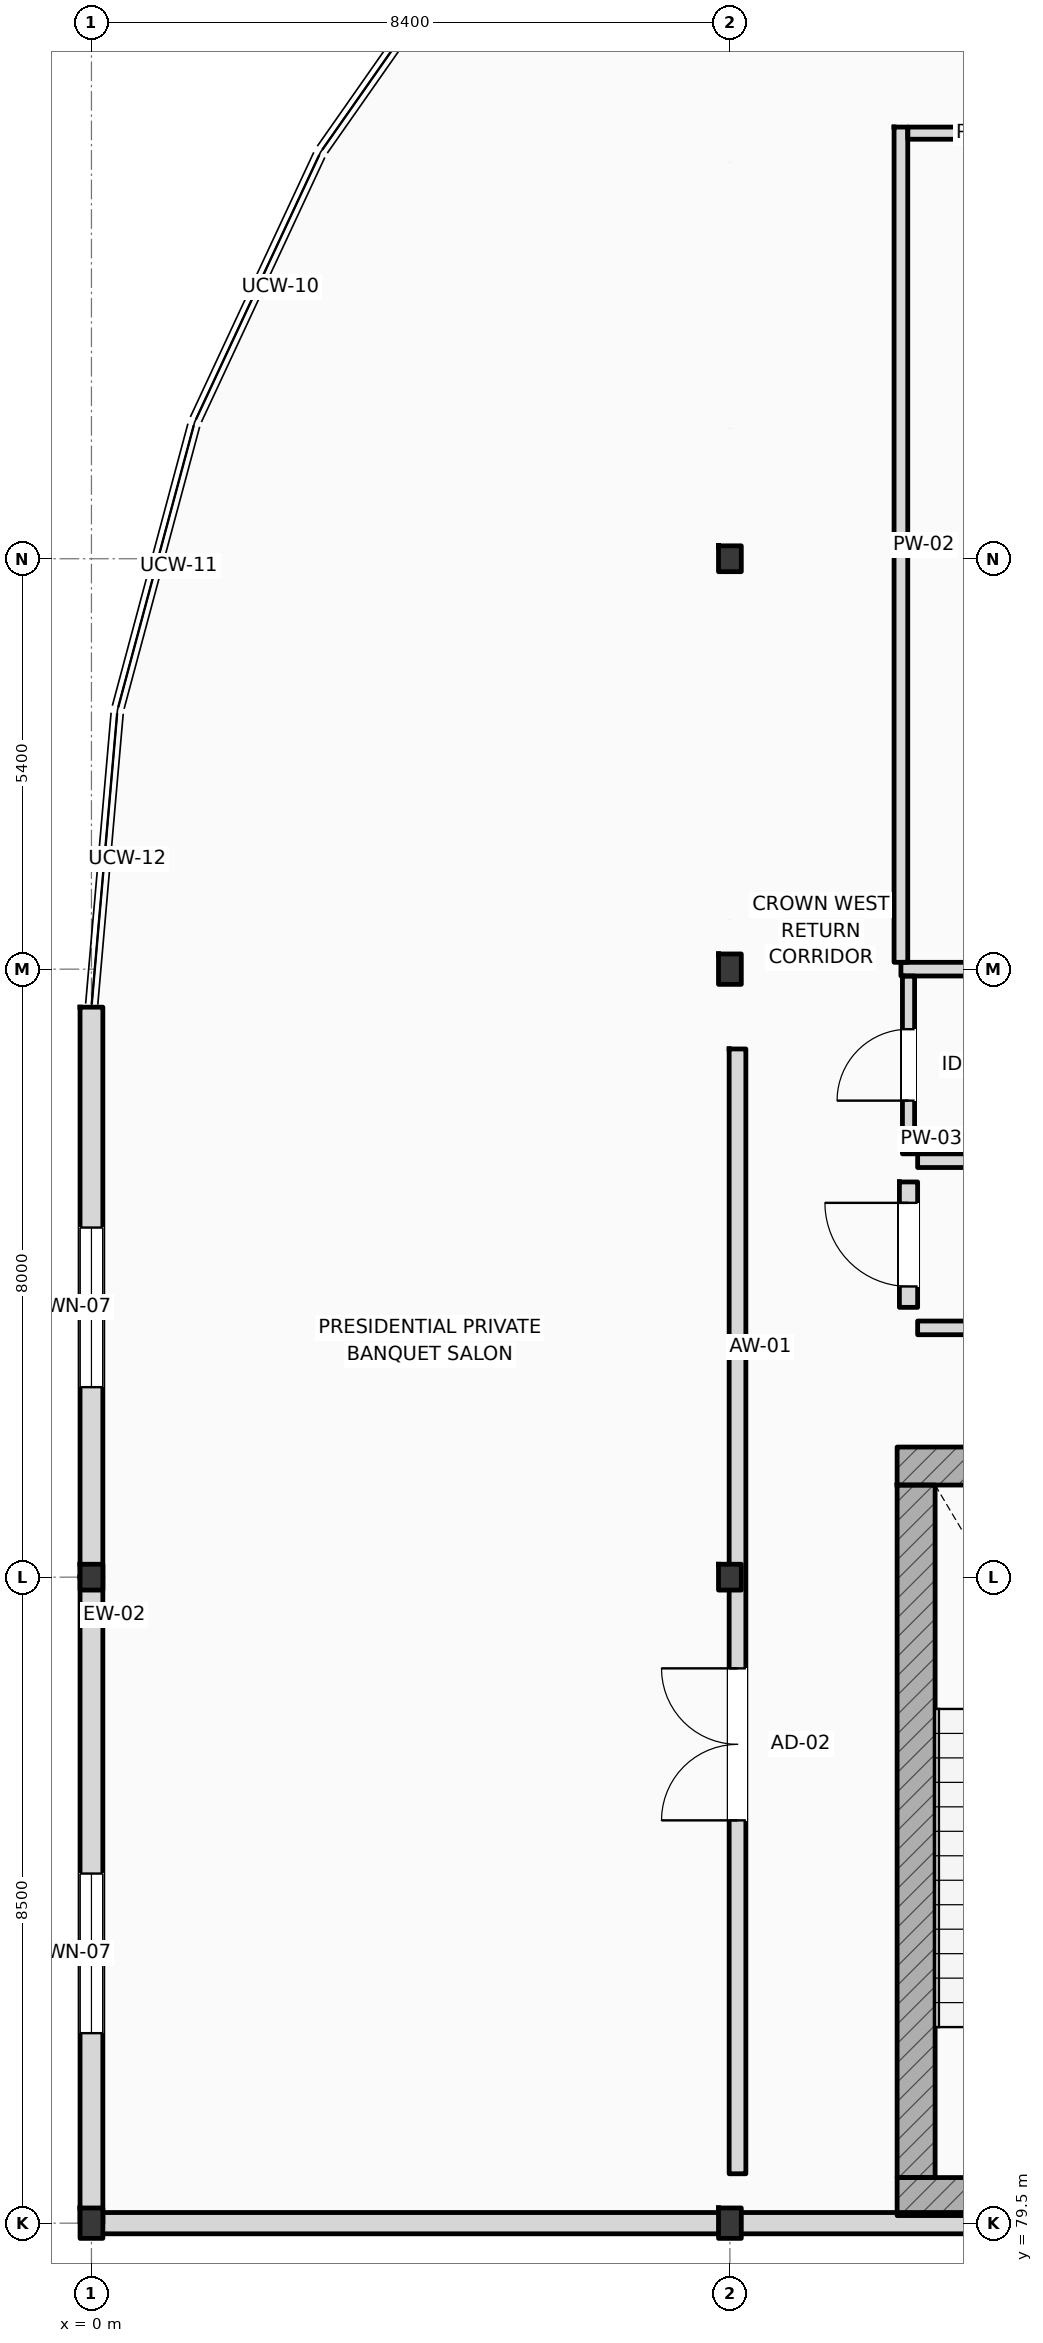
"""IFC4 building model, lengths in metres.
Left out: names, types, materials, properties, quantities, classifications, styles, units other than length and angle.
Written with IfcOpenShell. Run it as: python <this file> out.ifc"""

import sys

from ifc_helpers import new_model, si_unit, direction, frame, frame_2d, origin, origin_2d, place, context, subcontext, project, spatial, rectangle, i_section, extrude, element, fill, save


model = new_model("IFC4")
c1 = context("Model", 3, precision=1e-05, world=origin(), true_north=direction((0.0, 1.0)))
c2 = subcontext(c1, "Body", "Model", "MODEL_VIEW")
j1 = project(units=[si_unit("LENGTHUNIT", "METRE"), si_unit("PLANEANGLEUNIT", "RADIAN")], contexts=[c1])
p1 = place(None, origin())
s1 = spatial("IfcSite", under=j1, at=p1, CompositionType="ELEMENT")
p2 = place(p1, origin())
s2 = spatial("IfcBuilding", under=s1, at=p2, CompositionType="ELEMENT")
p3 = place(p2, frame((0.0, 0.0, 46.8)))
s3 = spatial("IfcBuildingStorey", under=s2, at=p3, CompositionType="ELEMENT", Elevation=46.8)
p4 = place(p3, frame((0.0, 79.5, 0.0), z_axis=(0.0, 0.0, 1.0), x_axis=(1.0, 0.0, 0.0)))
e1 = element("IfcColumn", 1, at=p4, inside=s3, PredefinedType="COLUMN", context=c2, shape_type="SweptSolid", body=[
    extrude(i_section(OverallWidth=0.3, OverallDepth=0.4, WebThickness=0.013, FlangeThickness=0.024, FilletRadius=0.027, at=origin_2d()), origin(), (0.0, 0.0, 1.0), 4.8),
])
p5 = place(p3, frame((0.0, 88.0, 0.0), z_axis=(0.0, 0.0, 1.0), x_axis=(1.0, 0.0, 0.0)))
e2 = element("IfcColumn", 2, at=p5, inside=s3, PredefinedType="COLUMN", context=c2, shape_type="SweptSolid", body=[
    extrude(i_section(OverallWidth=0.3, OverallDepth=0.34, WebThickness=0.012, FlangeThickness=0.021, FilletRadius=0.027, at=origin_2d()), origin(), (0.0, 0.0, 1.0), 4.8),
])
p6 = place(p3, frame((8.4, 79.5, 0.0), z_axis=(0.0, 0.0, 1.0), x_axis=(1.0, 0.0, 0.0)))
e3 = element("IfcColumn", 3, at=p6, inside=s3, PredefinedType="COLUMN", context=c2, shape_type="SweptSolid", body=[
    extrude(i_section(OverallWidth=0.3, OverallDepth=0.4, WebThickness=0.013, FlangeThickness=0.024, FilletRadius=0.027, at=origin_2d()), origin(), (0.0, 0.0, 1.0), 4.8),
])
p7 = place(p3, frame((8.4, 88.0, 0.0), z_axis=(0.0, 0.0, 1.0), x_axis=(1.0, 0.0, 0.0)))
e4 = element("IfcColumn", 4, at=p7, inside=s3, PredefinedType="COLUMN", context=c2, shape_type="SweptSolid", body=[
    extrude(i_section(OverallWidth=0.3, OverallDepth=0.34, WebThickness=0.012, FlangeThickness=0.021, FilletRadius=0.027, at=origin_2d()), origin(), (0.0, 0.0, 1.0), 4.8),
])
p8 = place(p3, frame((8.4, 96.0, 0.0), z_axis=(0.0, 0.0, 1.0), x_axis=(1.0, 0.0, 0.0)))
e5 = element("IfcColumn", 5, at=p8, inside=s3, PredefinedType="COLUMN", context=c2, shape_type="SweptSolid", body=[
    extrude(i_section(OverallWidth=0.3, OverallDepth=0.4, WebThickness=0.013, FlangeThickness=0.024, FilletRadius=0.027, at=origin_2d()), origin(), (0.0, 0.0, 1.0), 4.8),
])
p9 = place(p3, frame((8.4, 101.4, 0.0), z_axis=(0.0, 0.0, 1.0), x_axis=(1.0, 0.0, 0.0)))
e6 = element("IfcColumn", 6, at=p9, inside=s3, PredefinedType="COLUMN", context=c2, shape_type="SweptSolid", body=[
    extrude(i_section(OverallWidth=0.3, OverallDepth=0.34, WebThickness=0.012, FlangeThickness=0.021, FilletRadius=0.027, at=origin_2d()), origin(), (0.0, 0.0, 1.0), 4.8),
])
for number, where, z_axis, x_axis in (
    (7, (10.6, 89.462, 0.0), (0.0, 0.0, 1.0), (1.0, 0.0, 0.0)),
    (8, (10.6, 79.85, 0.0), (0.0, 0.0, 1.0), (1.0, 0.0, 0.0)),
):
    element("IfcWall", number, at=place(p3, frame(where, z_axis=z_axis, x_axis=x_axis)), inside=s3, PredefinedType="SHEAR", context=c2, shape_type="SweptSolid", body=[
        extrude(rectangle(XDim=5.16, YDim=0.5, at=frame_2d((2.58, 0.0))), origin(), (0.0, 0.0, 1.0), 4.8),
    ])
p10 = place(p3, frame((10.85, 80.1, 0.0), z_axis=(0.0, 0.0, 1.0), x_axis=(0.0, 1.0, 0.0)))
e9 = element("IfcWall", 9, at=p10, inside=s3, PredefinedType="SHEAR", context=c2, shape_type="SweptSolid", body=[
    extrude(rectangle(XDim=9.112, YDim=0.5, at=frame_2d((4.556, 0.0))), origin(), (0.0, 0.0, 1.0), 4.8),
])
p11 = place(p3, frame((0.0, 79.5, 0.0), z_axis=(0.0, 0.0, 1.0), x_axis=(0.0, 1.0, 0.0)))
e10 = element("IfcWall", 10, at=p11, inside=s3, PredefinedType="STANDARD", context=c2, shape_type="SweptSolid", body=[
    extrude(rectangle(XDim=8.5, YDim=0.3, at=frame_2d((4.25, 0.0))), origin(), (0.0, 0.0, 1.0), 4.17),
])
p12 = place(p11, frame((2.5, 0.0, 0.95)))
e11 = element("IfcOpeningElement", 11, at=p12, cuts=e10, PredefinedType="OPENING", context=c2, shape_type="SweptSolid", body=[
    extrude(rectangle(XDim=2.1, YDim=2.2, at=frame_2d((1.05, 1.1))), frame((0.0, 0.16, 0.0), z_axis=(0.0, -1.0, 0.0), x_axis=(1.0, 0.0, 0.0)), (0.0, 0.0, 1.0), 0.32),
])
p13 = place(p3, frame((0.0, 88.0, 0.0), z_axis=(0.0, 0.0, 1.0), x_axis=(0.0, 1.0, 0.0)))
e12 = element("IfcWall", 12, at=p13, inside=s3, PredefinedType="STANDARD", context=c2, shape_type="SweptSolid", body=[
    extrude(rectangle(XDim=7.5, YDim=0.3, at=frame_2d((3.75, 0.0))), origin(), (0.0, 0.0, 1.0), 4.54),
])
p14 = place(p13, frame((2.5, 0.0, 0.95)))
e13 = element("IfcOpeningElement", 13, at=p14, cuts=e12, PredefinedType="OPENING", context=c2, shape_type="SweptSolid", body=[
    extrude(rectangle(XDim=2.1, YDim=2.2, at=frame_2d((1.05, 1.1))), frame((0.0, 0.16, 0.0), z_axis=(0.0, -1.0, 0.0), x_axis=(1.0, 0.0, 0.0)), (0.0, 0.0, 1.0), 0.32),
])
p15 = place(p3, frame((0.0, 79.5, 0.0), z_axis=(0.0, 0.0, 1.0), x_axis=(1.0, 0.0, 0.0)))
e14 = element("IfcWall", 14, at=p15, inside=s3, PredefinedType="STANDARD", context=c2, shape_type="SweptSolid", body=[
    extrude(rectangle(XDim=25.2, YDim=0.28, at=frame_2d((12.6, 0.0))), origin(), (0.0, 0.0, 1.0), 3.98),
])
p16 = place(p3, frame((8.5, 80.15, 0.0), z_axis=(0.0, 0.0, 1.0), x_axis=(0.0, 1.0, 0.0)))
e15 = element("IfcWall", 15, at=p16, inside=s3, PredefinedType="PARTITIONING", context=c2, shape_type="SweptSolid", body=[
    extrude(rectangle(XDim=14.8, YDim=0.22, at=frame_2d((7.4, 0.0))), origin(), (0.0, 0.0, 1.0), 4.17),
])
p17 = place(p16, frame((4.65, 0.0, 0.0)))
e16 = element("IfcOpeningElement", 16, at=p17, cuts=e15, PredefinedType="OPENING", context=c2, shape_type="SweptSolid", body=[
    extrude(rectangle(XDim=2.0, YDim=2.35, at=frame_2d((1.0, 1.175))), frame((0.0, 0.12, 0.0), z_axis=(0.0, -1.0, 0.0), x_axis=(1.0, 0.0, 0.0)), (0.0, 0.0, 1.0), 0.24),
])
p18 = place(p3, frame((10.75, 91.55, 0.0), z_axis=(0.0, 0.0, 1.0), x_axis=(0.0, 1.0, 0.0)))
e17 = element("IfcWall", 17, at=p18, inside=s3, PredefinedType="STANDARD", context=c2, shape_type="SweptSolid", body=[
    extrude(rectangle(XDim=1.65, YDim=0.24, at=frame_2d((0.825, 0.0))), origin(), (0.0, 0.0, 1.0), 4.54),
])
p19 = place(p18, frame((0.275, 0.0, 0.0)))
e18 = element("IfcOpeningElement", 18, at=p19, cuts=e17, PredefinedType="OPENING", context=c2, shape_type="SweptSolid", body=[
    extrude(rectangle(XDim=1.1, YDim=2.2, at=frame_2d((0.55, 1.1))), frame((0.0, 0.13, 0.0), z_axis=(0.0, -1.0, 0.0), x_axis=(1.0, 0.0, 0.0)), (0.0, 0.0, 1.0), 0.26),
])
p20 = place(p3, frame((10.75, 93.57, 0.0), z_axis=(0.0, 0.0, 1.0), x_axis=(0.0, 1.0, 0.0)))
e19 = element("IfcWall", 19, at=p20, inside=s3, PredefinedType="PARTITIONING", context=c2, shape_type="SweptSolid", body=[
    extrude(rectangle(XDim=2.34, YDim=0.16, at=frame_2d((1.17, 0.0))), origin(), (0.0, 0.0, 1.0), 4.54),
])
p21 = place(p20, frame((0.7, 0.0, 0.0)))
e20 = element("IfcOpeningElement", 20, at=p21, cuts=e19, PredefinedType="OPENING", context=c2, shape_type="SweptSolid", body=[
    extrude(rectangle(XDim=0.94, YDim=2.15, at=frame_2d((0.47, 1.075))), frame((0.0, 0.09, 0.0), z_axis=(0.0, -1.0, 0.0), x_axis=(1.0, 0.0, 0.0)), (0.0, 0.0, 1.0), 0.18),
])
p22 = place(p3, frame((10.74, 107.0, 0.0), z_axis=(0.0, 0.0, 1.0), x_axis=(1.0, 0.0, 0.0)))
e21 = element("IfcWall", 21, at=p22, inside=s3, PredefinedType="PARTITIONING", context=c2, shape_type="SweptSolid", body=[
    extrude(rectangle(XDim=4.47, YDim=0.16, at=frame_2d((2.235, 0.0))), origin(), (0.0, 0.0, 1.0), 4.54),
])
p23 = place(p22, frame((1.785, 0.0, 0.0)))
e22 = element("IfcOpeningElement", 22, at=p23, cuts=e21, PredefinedType="OPENING", context=c2, shape_type="SweptSolid", body=[
    extrude(rectangle(XDim=0.9, YDim=2.1, at=frame_2d((0.45, 1.05))), frame((0.0, 0.09, 0.0), z_axis=(0.0, -1.0, 0.0), x_axis=(1.0, 0.0, 0.0)), (0.0, 0.0, 1.0), 0.18),
])
for number, where, z_axis, x_axis in (
    (23, (10.87, 91.28, 0.0), (0.0, 0.0, 1.0), (1.0, 0.0, 0.0)),
    (24, (10.87, 93.48, 0.0), (0.0, 0.0, 1.0), (1.0, 0.0, 0.0)),
):
    element("IfcWall", number, at=place(p3, frame(where, z_axis=z_axis, x_axis=x_axis)), inside=s3, PredefinedType="PARTITIONING", context=c2, shape_type="SweptSolid", body=[
        extrude(rectangle(XDim=6.17, YDim=0.18, at=frame_2d((3.085, 0.0))), origin(), (0.0, 0.0, 1.0), 4.54),
    ])
p24 = place(p3, frame((10.65, 96.0, 0.0), z_axis=(0.0, 0.0, 1.0), x_axis=(1.0, 0.0, 0.0)))
e25 = element("IfcWall", 25, at=p24, inside=s3, PredefinedType="PARTITIONING", context=c2, shape_type="SweptSolid", body=[
    extrude(rectangle(XDim=5.95, YDim=0.18, at=frame_2d((2.975, 0.0))), origin(), (0.0, 0.0, 1.0), 3.98),
])
p25 = place(p3, frame((10.65, 96.09, 0.0), z_axis=(0.0, 0.0, 1.0), x_axis=(0.0, 1.0, 0.0)))
e26 = element("IfcWall", 26, at=p25, inside=s3, PredefinedType="PARTITIONING", context=c2, shape_type="SweptSolid", body=[
    extrude(rectangle(XDim=10.99, YDim=0.18, at=frame_2d((5.495, 0.0))), origin(), (0.0, 0.0, 1.0), 4.54),
])
p26 = place(p12, origin())
e27 = element("IfcWindow", 27, at=p26, inside=s3, PartitioningType="DOUBLE_PANEL_VERTICAL", PredefinedType="WINDOW", context=c2, shape_type="SweptSolid", body=[
    extrude(rectangle(XDim=2.1, YDim=2.2, at=frame_2d((1.05, 1.1))), frame((0.0, 0.03, 0.0), z_axis=(0.0, -1.0, 0.0), x_axis=(1.0, 0.0, 0.0)), (0.0, 0.0, 1.0), 0.06),
])
fill(e11, e27)
p27 = place(p14, origin())
e28 = element("IfcWindow", 28, at=p27, inside=s3, PartitioningType="DOUBLE_PANEL_VERTICAL", PredefinedType="WINDOW", context=c2, shape_type="SweptSolid", body=[
    extrude(rectangle(XDim=2.1, YDim=2.2, at=frame_2d((1.05, 1.1))), frame((0.0, 0.03, 0.0), z_axis=(0.0, -1.0, 0.0), x_axis=(1.0, 0.0, 0.0)), (0.0, 0.0, 1.0), 0.06),
])
fill(e13, e28)
p28 = place(p17, origin())
e29 = element("IfcDoor", 29, at=p28, inside=s3, OperationType="DOUBLE_SWING_LEFT", PredefinedType="DOOR", context=c2, shape_type="SweptSolid", body=[
    extrude(rectangle(XDim=2.0, YDim=2.35, at=frame_2d((1.0, 1.175))), frame((0.0, 0.025, 0.0), z_axis=(0.0, -1.0, 0.0), x_axis=(1.0, 0.0, 0.0)), (0.0, 0.0, 1.0), 0.05),
])
fill(e16, e29)
p29 = place(p19, origin())
e30 = element("IfcDoor", 30, at=p29, inside=s3, OperationType="SINGLE_SWING_RIGHT", PredefinedType="DOOR", context=c2, shape_type="SweptSolid", body=[
    extrude(rectangle(XDim=1.1, YDim=2.2, at=frame_2d((0.55, 1.1))), frame((0.0, 0.025, 0.0), z_axis=(0.0, -1.0, 0.0), x_axis=(1.0, 0.0, 0.0)), (0.0, 0.0, 1.0), 0.05),
])
fill(e18, e30)
p30 = place(p21, origin())
e31 = element("IfcDoor", 31, at=p30, inside=s3, OperationType="SINGLE_SWING_LEFT", PredefinedType="DOOR", context=c2, shape_type="SweptSolid", body=[
    extrude(rectangle(XDim=0.94, YDim=2.15, at=frame_2d((0.47, 1.075))), frame((0.0, 0.025, 0.0), z_axis=(0.0, -1.0, 0.0), x_axis=(1.0, 0.0, 0.0)), (0.0, 0.0, 1.0), 0.05),
])
fill(e20, e31)
save(model, sys.argv[1])
